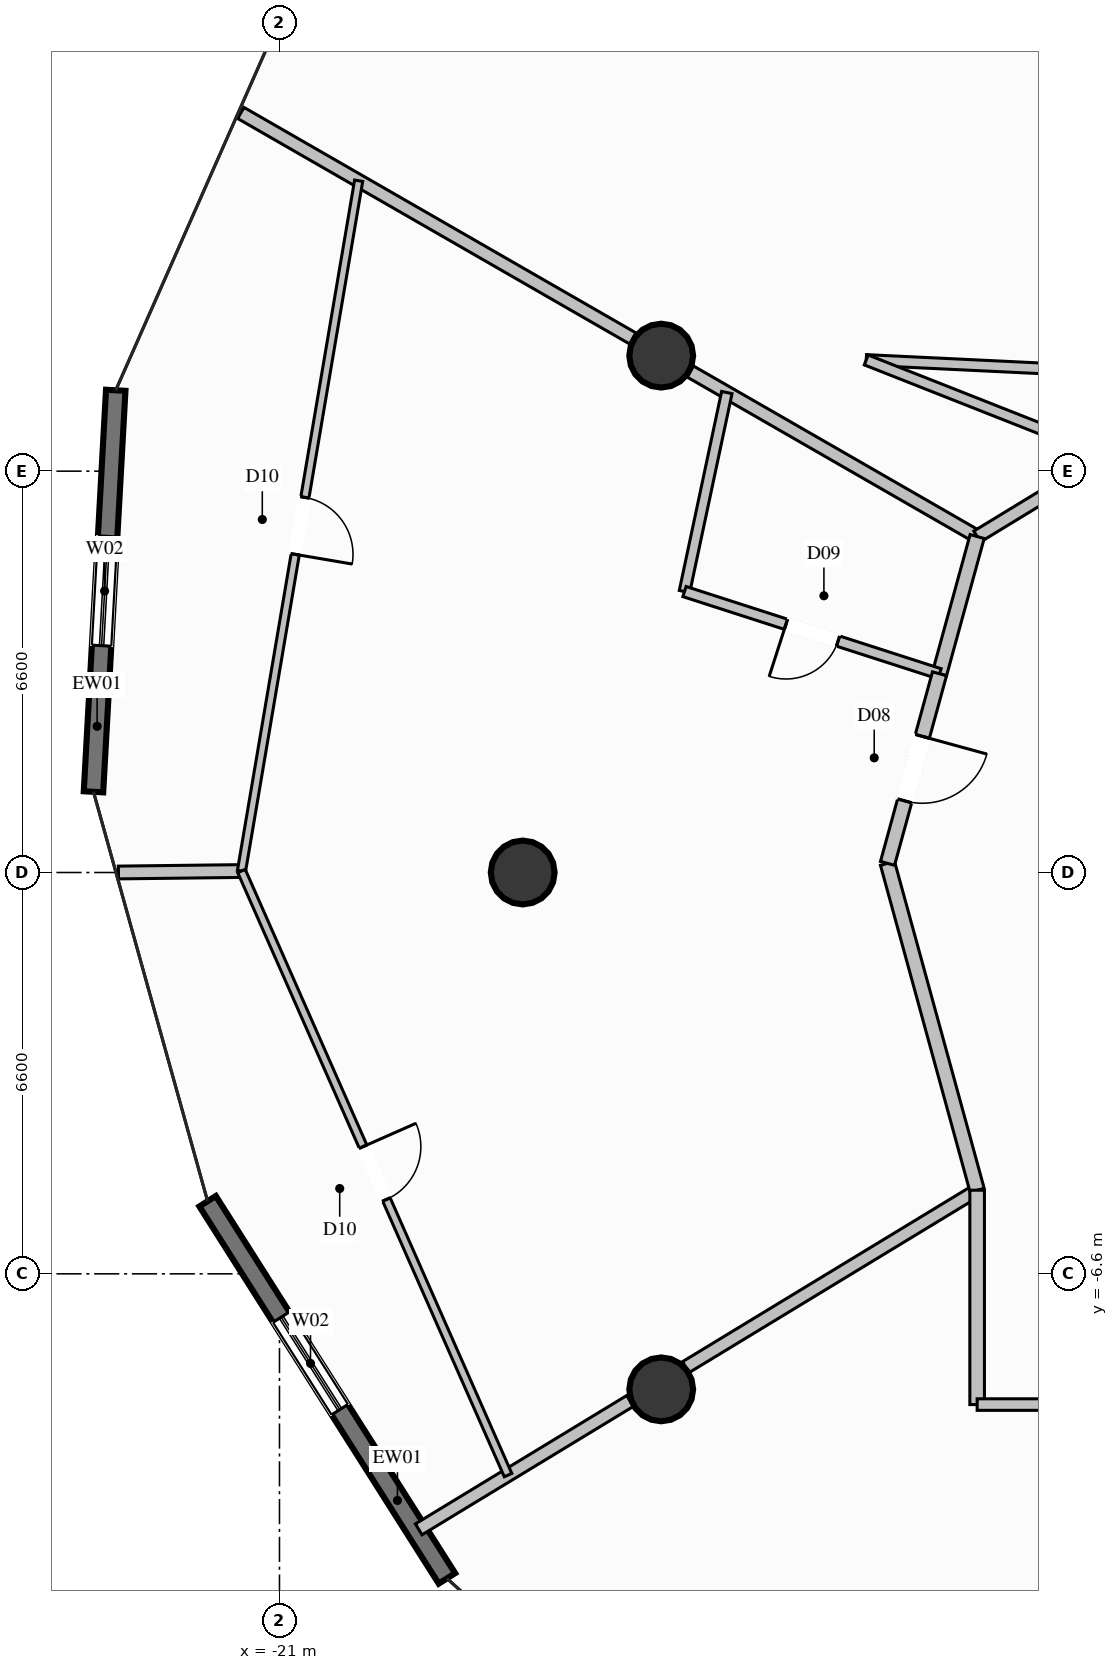
"""IFC4 building model, lengths in metres.
Left out: names, types, materials, properties, quantities, classifications, styles, units other than length and angle.
Written with IfcOpenShell. Run it as: python <this file> out.ifc"""

import sys

from ifc_helpers import new_model, si_unit, direction, frame, frame_2d, origin, origin_2d, place, context, subcontext, project, spatial, rectangle, circle, extrude, element, fill, save


model = new_model("IFC4")
c1 = context("Model", 3, precision=1e-05, world=origin(), true_north=direction((0.0, 1.0)))
c2 = subcontext(c1, "Body", "Model", "MODEL_VIEW")
j1 = project(units=[si_unit("LENGTHUNIT", "METRE"), si_unit("PLANEANGLEUNIT", "RADIAN")], contexts=[c1])
p1 = place(None, origin())
s1 = spatial("IfcSite", under=j1, at=p1, CompositionType="ELEMENT")
p2 = place(p1, origin())
s2 = spatial("IfcBuilding", under=s1, at=p2, CompositionType="ELEMENT")
p3 = place(p2, frame((0.0, 0.0, 117.0)))
s3 = spatial("IfcBuildingStorey", under=s2, at=p3, CompositionType="ELEMENT", Elevation=117.0)
for number, where, z_axis, x_axis in (
    (1, (-14.722, 8.5, 0.0), (0.0, 0.0, 1.0), (1.0, 0.0, 0.0)),
    (2, (-17.0, 0.0, 0.0), (0.0, 0.0, 1.0), (1.0, 0.0, 0.0)),
    (3, (-14.722, -8.5, 0.0), (0.0, 0.0, 1.0), (1.0, 0.0, 0.0)),
):
    element("IfcColumn", number, at=place(p3, frame(where, z_axis=z_axis, x_axis=x_axis)), inside=s3, PredefinedType="COLUMN", context=c2, shape_type="SweptSolid", body=[
        extrude(circle(Radius=0.525, at=origin_2d()), origin(), (0.0, 0.0, 1.0), 3.6),
    ])
p4 = place(p3, frame((-24.059, 1.327, 0.0), z_axis=(0.0, 0.0, 1.0), x_axis=(0.055339161213, 0.998467614516, 0.0)))
e4 = element("IfcWall", 4, at=p4, inside=s3, PredefinedType="SOLIDWALL", context=c2, shape_type="SweptSolid", body=[
    extrude(rectangle(XDim=6.613, YDim=0.32, at=frame_2d((3.307, 0.0))), origin(), (0.0, 0.0, 1.0), 3.35),
])
p5 = place(p4, frame((2.407, 0.0, 0.35)))
e5 = element("IfcOpeningElement", 5, at=p5, cuts=e4, PredefinedType="OPENING", context=c2, shape_type="SweptSolid", body=[
    extrude(rectangle(XDim=1.8, YDim=2.6, at=frame_2d((0.9, 1.3))), frame((0.0, 0.17, 0.0), z_axis=(0.0, -1.0, 0.0), x_axis=(1.0, 0.0, 0.0)), (0.0, 0.0, 1.0), 0.34),
])
p6 = place(p3, frame((-18.246, -11.609, 0.0), z_axis=(0.0, 0.0, 1.0), x_axis=(-0.535761107492, 0.844369608465, 0.0)))
e6 = element("IfcWall", 6, at=p6, inside=s3, PredefinedType="SOLIDWALL", context=c2, shape_type="SweptSolid", body=[
    extrude(rectangle(XDim=7.346, YDim=0.32, at=frame_2d((3.673, 0.0))), origin(), (0.0, 0.0, 1.0), 3.35),
])
p7 = place(p6, frame((3.288, 0.0, 0.35)))
e7 = element("IfcOpeningElement", 7, at=p7, cuts=e6, PredefinedType="OPENING", context=c2, shape_type="SweptSolid", body=[
    extrude(rectangle(XDim=1.8, YDim=2.6, at=frame_2d((0.9, 1.3))), frame((0.0, 0.17, 0.0), z_axis=(0.0, -1.0, 0.0), x_axis=(1.0, 0.0, 0.0)), (0.0, 0.0, 1.0), 0.34),
])
p8 = place(p3, frame((-9.526, 5.525, 0.0), z_axis=(0.0, 0.0, 1.0), x_axis=(-0.866806949329, 0.498643873516, 0.0)))
e8 = element("IfcWall", 8, at=p8, inside=s3, PredefinedType="PARTITIONING", context=c2, shape_type="SweptSolid", body=[
    extrude(rectangle(XDim=5.443, YDim=0.21, at=frame_2d((2.721, 0.0))), origin(), (0.0, 0.0, 1.0), 2.791),
])
p9 = place(p3, frame((-15.188, 8.782, 0.0), z_axis=(0.0, 0.0, 1.0), x_axis=(-0.86682580489, 0.498611094919, 0.0)))
e9 = element("IfcWall", 9, at=p9, inside=s3, PredefinedType="PARTITIONING", context=c2, shape_type="SweptSolid", body=[
    extrude(rectangle(XDim=7.439, YDim=0.21, at=frame_2d((3.719, 0.0))), origin(), (0.0, 0.0, 1.0), 3.35),
])
p10 = place(p3, frame((-9.526, -5.225, 0.0), z_axis=(0.0, 0.0, 1.0), x_axis=(-0.854760607392, -0.519022450431, 0.0)))
e10 = element("IfcWall", 10, at=p10, inside=s3, PredefinedType="PARTITIONING", context=c2, shape_type="SweptSolid", body=[
    extrude(rectangle(XDim=5.606, YDim=0.21, at=frame_2d((2.803, 0.0))), origin(), (0.0, 0.0, 1.0), 2.791),
])
p11 = place(p3, frame((-15.233, -8.69, 0.0), z_axis=(0.0, 0.0, 1.0), x_axis=(-0.854679107343, -0.519156646371, 0.0)))
e11 = element("IfcWall", 11, at=p11, inside=s3, PredefinedType="PARTITIONING", context=c2, shape_type="SweptSolid", body=[
    extrude(rectangle(XDim=4.068, YDim=0.21, at=frame_2d((2.034, 0.0))), origin(), (0.0, 0.0, 1.0), 3.35),
])
p12 = place(p3, frame((-11.35, 8.429, 0.0), z_axis=(0.0, 0.0, 1.0), x_axis=(0.998846720144, -0.048012807228, 0.0)))
e12 = element("IfcWall", 12, at=p12, inside=s3, PredefinedType="PLUMBINGWALL", context=c2, shape_type="SweptSolid", body=[
    extrude(rectangle(XDim=5.416, YDim=0.175, at=frame_2d((2.708, 0.0))), origin(), (0.0, 0.0, 1.0), 3.35),
])
p13 = place(p3, frame((-11.35, 8.429, 0.0), z_axis=(0.0, 0.0, 1.0), x_axis=(0.930162364503, -0.367148438186, 0.0)))
e13 = element("IfcWall", 13, at=p13, inside=s3, PredefinedType="PLUMBINGWALL", context=c2, shape_type="SweptSolid", body=[
    extrude(rectangle(XDim=4.3, YDim=0.175, at=frame_2d((2.15, 0.0))), origin(), (0.0, 0.0, 1.0), 2.791),
])
p14 = place(p3, frame((-9.526, 5.525, 0.0), z_axis=(0.0, 0.0, 1.0), x_axis=(0.854057882133, 0.520177982969, 0.0)))
e14 = element("IfcWall", 14, at=p14, inside=s3, PredefinedType="PARTITIONING", context=c2, shape_type="SweptSolid", body=[
    extrude(rectangle(XDim=2.548, YDim=0.21, at=frame_2d((1.274, 0.0))), origin(), (0.0, 0.0, 1.0), 3.35),
])
p15 = place(p3, frame((-9.526, 5.525, 0.0), z_axis=(0.0, 0.0, 1.0), x_axis=(-0.264564800962, -0.964367910132, 0.0)))
e15 = element("IfcWall", 15, at=p15, inside=s3, PredefinedType="PARTITIONING", context=c2, shape_type="SweptSolid", body=[
    extrude(rectangle(XDim=2.34, YDim=0.24, at=frame_2d((1.17, 0.0))), origin(), (0.0, 0.0, 1.0), 3.35),
])
p16 = place(p3, frame((-13.643, 7.893, 0.0), z_axis=(0.0, 0.0, 1.0), x_axis=(-0.208014079253, -0.978125831799, 0.0)))
e16 = element("IfcWall", 16, at=p16, inside=s3, PredefinedType="PLUMBINGWALL", context=c2, shape_type="SweptSolid", body=[
    extrude(rectangle(XDim=3.346, YDim=0.175, at=frame_2d((1.673, 0.0))), origin(), (0.0, 0.0, 1.0), 3.35),
])
p17 = place(p3, frame((-10.145, 3.268, 0.0), z_axis=(0.0, 0.0, 1.0), x_axis=(-0.951767084273, 0.306821474632, 0.0)))
e17 = element("IfcWall", 17, at=p17, inside=s3, PredefinedType="PLUMBINGWALL", context=c2, shape_type="SweptSolid", body=[
    extrude(rectangle(XDim=4.407, YDim=0.175, at=frame_2d((2.203, 0.0))), origin(), (0.0, 0.0, 1.0), 3.35),
])
p18 = place(p17, frame((1.753, 0.0, 0.0)))
e18 = element("IfcOpeningElement", 18, at=p18, cuts=e17, PredefinedType="OPENING", context=c2, shape_type="SweptSolid", body=[
    extrude(rectangle(XDim=0.9, YDim=2.1, at=frame_2d((0.45, 1.05))), frame((0.0, 0.098, 0.0), z_axis=(0.0, -1.0, 0.0), x_axis=(1.0, 0.0, 0.0)), (0.0, 0.0, 1.0), 0.195),
])
p19 = place(p3, frame((-21.625, 0.024, 0.0), z_axis=(0.0, 0.0, 1.0), x_axis=(-0.999930133727, -0.01182064573, 0.0)))
e19 = element("IfcWall", 19, at=p19, inside=s3, PredefinedType="PARTITIONING", context=c2, shape_type="SweptSolid", body=[
    extrude(rectangle(XDim=2.024, YDim=0.21, at=frame_2d((1.012, 0.0))), origin(), (0.0, 0.0, 1.0), 3.35),
])
p20 = place(p3, frame((-11.0, 0.15, 0.0), z_axis=(0.0, 0.0, 1.0), x_axis=(0.264488542062, -0.964388827765, 0.0)))
e20 = element("IfcWall", 20, at=p20, inside=s3, PredefinedType="PARTITIONING", context=c2, shape_type="SweptSolid", body=[
    extrude(rectangle(XDim=5.573, YDim=0.24, at=frame_2d((2.787, 0.0))), origin(), (0.0, 0.0, 1.0), 3.35),
])
p21 = place(p3, frame((-10.145, 3.268, 0.0), z_axis=(0.0, 0.0, 1.0), x_axis=(-0.264433345006, -0.96440396414, 0.0)))
e21 = element("IfcWall", 21, at=p21, inside=s3, PredefinedType="PARTITIONING", context=c2, shape_type="SweptSolid", body=[
    extrude(rectangle(XDim=3.233, YDim=0.24, at=frame_2d((1.617, 0.0))), origin(), (0.0, 0.0, 1.0), 3.35),
])
p22 = place(p21, frame((1.067, 0.0, 0.0)))
e22 = element("IfcOpeningElement", 22, at=p22, cuts=e21, PredefinedType="OPENING", context=c2, shape_type="SweptSolid", body=[
    extrude(rectangle(XDim=1.1, YDim=2.3, at=frame_2d((0.55, 1.15))), frame((0.0, 0.13, 0.0), z_axis=(0.0, -1.0, 0.0), x_axis=(1.0, 0.0, 0.0)), (0.0, 0.0, 1.0), 0.26),
])
p23 = place(p3, frame((-19.698, 11.376, 0.0), z_axis=(0.0, 0.0, 1.0), x_axis=(-0.167355206253, -0.985896665447, 0.0)))
e23 = element("IfcWall", 23, at=p23, inside=s3, PredefinedType="PARTITIONING", context=c2, shape_type="SweptSolid", body=[
    extrude(rectangle(XDim=11.514, YDim=0.135, at=frame_2d((5.757, 0.0))), origin(), (0.0, 0.0, 1.0), 3.35),
])
p24 = place(p23, frame((5.282, 0.0, 0.0)))
e24 = element("IfcOpeningElement", 24, at=p24, cuts=e23, PredefinedType="OPENING", context=c2, shape_type="SweptSolid", body=[
    extrude(rectangle(XDim=0.95, YDim=2.1, at=frame_2d((0.475, 1.05))), frame((0.0, 0.078, 0.0), z_axis=(0.0, -1.0, 0.0), x_axis=(1.0, 0.0, 0.0)), (0.0, 0.0, 1.0), 0.155),
])
p25 = place(p3, frame((-21.625, 0.024, 0.0), z_axis=(0.0, 0.0, 1.0), x_axis=(0.403752576745, -0.914868218254, 0.0)))
e25 = element("IfcWall", 25, at=p25, inside=s3, PredefinedType="PARTITIONING", context=c2, shape_type="SweptSolid", body=[
    extrude(rectangle(XDim=10.858, YDim=0.135, at=frame_2d((5.429, 0.0))), origin(), (0.0, 0.0, 1.0), 3.35),
])
p26 = place(p25, frame((4.954, 0.0, 0.0)))
e26 = element("IfcOpeningElement", 26, at=p26, cuts=e25, PredefinedType="OPENING", context=c2, shape_type="SweptSolid", body=[
    extrude(rectangle(XDim=0.95, YDim=2.1, at=frame_2d((0.475, 1.05))), frame((0.0, 0.078, 0.0), z_axis=(0.0, -1.0, 0.0), x_axis=(1.0, 0.0, 0.0)), (0.0, 0.0, 1.0), 0.155),
])
p27 = place(p3, frame((-9.526, -5.225, 0.0), z_axis=(0.0, 0.0, 1.0), x_axis=(0.0, -1.0, 0.0)))
e27 = element("IfcWall", 27, at=p27, inside=s3, PredefinedType="PARTITIONING", context=c2, shape_type="SweptSolid", body=[
    extrude(rectangle(XDim=3.525, YDim=0.24, at=frame_2d((1.762, 0.0))), origin(), (0.0, 0.0, 1.0), 3.35),
])
p28 = place(p3, frame((-9.526, -8.75, 0.0), z_axis=(0.0, 0.0, 1.0), x_axis=(1.0, 0.0, 0.0)))
e28 = element("IfcWall", 28, at=p28, inside=s3, PredefinedType="PARTITIONING", context=c2, shape_type="SweptSolid", body=[
    extrude(rectangle(XDim=9.526, YDim=0.19, at=frame_2d((4.763, 0.0))), origin(), (0.0, 0.0, 1.0), 3.35),
])
p29 = place(p28, frame((4.288, 0.0, 0.0)))
e29 = element("IfcOpeningElement", 29, at=p29, cuts=e28, PredefinedType="OPENING", context=c2, shape_type="SweptSolid", body=[
    extrude(rectangle(XDim=0.95, YDim=2.1, at=frame_2d((0.475, 1.05))), frame((0.0, 0.105, 0.0), z_axis=(0.0, -1.0, 0.0), x_axis=(1.0, 0.0, 0.0)), (0.0, 0.0, 1.0), 0.21),
])
p30 = place(p5, origin())
e30 = element("IfcWindow", 30, at=p30, inside=s3, PartitioningType="SINGLE_PANEL", PredefinedType="WINDOW", context=c2, shape_type="SweptSolid", body=[
    extrude(rectangle(XDim=1.8, YDim=2.6, at=frame_2d((0.9, 1.3))), frame((0.0, 0.03, 0.0), z_axis=(0.0, -1.0, 0.0), x_axis=(1.0, 0.0, 0.0)), (0.0, 0.0, 1.0), 0.06),
])
fill(e5, e30)
p31 = place(p7, origin())
e31 = element("IfcWindow", 31, at=p31, inside=s3, PartitioningType="SINGLE_PANEL", PredefinedType="WINDOW", context=c2, shape_type="SweptSolid", body=[
    extrude(rectangle(XDim=1.8, YDim=2.6, at=frame_2d((0.9, 1.3))), frame((0.0, 0.03, 0.0), z_axis=(0.0, -1.0, 0.0), x_axis=(1.0, 0.0, 0.0)), (0.0, 0.0, 1.0), 0.06),
])
fill(e7, e31)
p32 = place(p18, origin())
e32 = element("IfcDoor", 32, at=p32, inside=s3, OperationType="SINGLE_SWING_RIGHT", PredefinedType="DOOR", context=c2, shape_type="SweptSolid", body=[
    extrude(rectangle(XDim=0.9, YDim=2.1, at=frame_2d((0.45, 1.05))), frame((0.0, 0.025, 0.0), z_axis=(0.0, -1.0, 0.0), x_axis=(1.0, 0.0, 0.0)), (0.0, 0.0, 1.0), 0.05),
])
fill(e18, e32)
p33 = place(p22, origin())
e33 = element("IfcDoor", 33, at=p33, inside=s3, OperationType="SINGLE_SWING_LEFT", PredefinedType="DOOR", context=c2, shape_type="SweptSolid", body=[
    extrude(rectangle(XDim=1.1, YDim=2.3, at=frame_2d((0.55, 1.15))), frame((0.0, 0.025, 0.0), z_axis=(0.0, -1.0, 0.0), x_axis=(1.0, 0.0, 0.0)), (0.0, 0.0, 1.0), 0.05),
])
fill(e22, e33)
p34 = place(p24, origin())
e34 = element("IfcDoor", 34, at=p34, inside=s3, OperationType="SINGLE_SWING_RIGHT", PredefinedType="DOOR", context=c2, shape_type="SweptSolid", body=[
    extrude(rectangle(XDim=0.95, YDim=2.1, at=frame_2d((0.475, 1.05))), frame((0.0, 0.025, 0.0), z_axis=(0.0, -1.0, 0.0), x_axis=(1.0, 0.0, 0.0)), (0.0, 0.0, 1.0), 0.05),
])
fill(e24, e34)
p35 = place(p26, origin())
e35 = element("IfcDoor", 35, at=p35, inside=s3, OperationType="SINGLE_SWING_LEFT", PredefinedType="DOOR", context=c2, shape_type="SweptSolid", body=[
    extrude(rectangle(XDim=0.95, YDim=2.1, at=frame_2d((0.475, 1.05))), frame((0.0, 0.025, 0.0), z_axis=(0.0, -1.0, 0.0), x_axis=(1.0, 0.0, 0.0)), (0.0, 0.0, 1.0), 0.05),
])
fill(e26, e35)
save(model, sys.argv[1])
